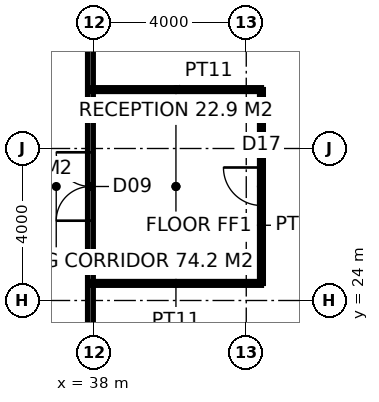
"""IFC4 building model, lengths in metres.
Left out: names, types, materials, properties, quantities, classifications, styles, units other than length and angle.
Written with IfcOpenShell. Run it as: python <this file> out.ifc"""

import sys

from ifc_helpers import new_model, si_unit, direction, frame, frame_2d, origin, place, context, subcontext, project, spatial, rectangle, extrude, element, fill, save


model = new_model("IFC4")
c1 = context("Model", 3, precision=1e-05, world=origin(), true_north=direction((0.0, 1.0)))
c2 = subcontext(c1, "Body", "Model", "MODEL_VIEW")
j1 = project(units=[si_unit("LENGTHUNIT", "METRE"), si_unit("PLANEANGLEUNIT", "RADIAN")], contexts=[c1])
p1 = place(None, origin())
s1 = spatial("IfcSite", under=j1, at=p1, CompositionType="ELEMENT")
p2 = place(p1, origin())
s2 = spatial("IfcBuilding", under=s1, at=p2, CompositionType="ELEMENT")
p3 = place(p2, frame((0.0, 0.0, 147.8)))
s3 = spatial("IfcBuildingStorey", under=s2, at=p3, CompositionType="ELEMENT", Elevation=147.8)
p4 = place(p3, frame((37.9, 15.625, 0.0), z_axis=(0.0, 0.0, 1.0), x_axis=(0.0, 1.0, 0.0)))
e1 = element("IfcWall", 1, at=p4, inside=s3, PredefinedType="PARTITIONING", context=c2, shape_type="SweptSolid", body=[
    extrude(rectangle(XDim=22.75, YDim=0.15, at=frame_2d((11.375, 0.0))), origin(), (0.0, 0.0, 1.0), 2.95),
])
p5 = place(p4, frame((10.475, 0.0, 0.0)))
e2 = element("IfcOpeningElement", 2, at=p5, cuts=e1, PredefinedType="OPENING", context=c2, shape_type="SweptSolid", body=[
    extrude(rectangle(XDim=1.8, YDim=2.4, at=frame_2d((0.9, 1.2))), frame((0.0, 0.085, 0.0), z_axis=(0.0, -1.0, 0.0), x_axis=(1.0, 0.0, 0.0)), (0.0, 0.0, 1.0), 0.17),
])
p6 = place(p3, frame((37.9, 24.45, 0.0), z_axis=(0.0, 0.0, 1.0), x_axis=(1.0, 0.0, 0.0)))
e3 = element("IfcWall", 3, at=p6, inside=s3, PredefinedType="PARTITIONING", context=c2, shape_type="SweptSolid", body=[
    extrude(rectangle(XDim=4.5, YDim=0.1, at=frame_2d((2.25, 0.0))), origin(), (0.0, 0.0, 1.0), 3.85),
])
p7 = place(p3, frame((42.4, 24.45, 0.0), z_axis=(0.0, 0.0, 1.0), x_axis=(0.0, 1.0, 0.0)))
e4 = element("IfcWall", 4, at=p7, inside=s3, PredefinedType="PARTITIONING", context=c2, shape_type="SweptSolid", body=[
    extrude(rectangle(XDim=5.1, YDim=0.1, at=frame_2d((2.55, 0.0))), origin(), (0.0, 0.0, 1.0), 3.85),
])
p8 = place(p7, frame((2.05, 0.0, 0.0)))
e5 = element("IfcOpeningElement", 5, at=p8, cuts=e4, PredefinedType="OPENING", context=c2, shape_type="SweptSolid", body=[
    extrude(rectangle(XDim=1.0, YDim=2.2, at=frame_2d((0.5, 1.1))), frame((0.0, 0.06, 0.0), z_axis=(0.0, -1.0, 0.0), x_axis=(1.0, 0.0, 0.0)), (0.0, 0.0, 1.0), 0.12),
])
p9 = place(p3, frame((42.4, 29.55, 0.0), z_axis=(0.0, 0.0, 1.0), x_axis=(-1.0, 0.0, 0.0)))
e6 = element("IfcWall", 6, at=p9, inside=s3, PredefinedType="PARTITIONING", context=c2, shape_type="SweptSolid", body=[
    extrude(rectangle(XDim=4.5, YDim=0.1, at=frame_2d((2.25, 0.0))), origin(), (0.0, 0.0, 1.0), 3.85),
])
p10 = place(p5, origin())
e7 = element("IfcDoor", 7, at=p10, inside=s3, OperationType="DOUBLE_DOOR_DOUBLE_SWING", PredefinedType="DOOR", context=c2, shape_type="SweptSolid", body=[
    extrude(rectangle(XDim=1.8, YDim=2.4, at=frame_2d((0.9, 1.2))), frame((0.0, 0.025, 0.0), z_axis=(0.0, -1.0, 0.0), x_axis=(1.0, 0.0, 0.0)), (0.0, 0.0, 1.0), 0.05),
])
fill(e2, e7)
p11 = place(p8, origin())
e8 = element("IfcDoor", 8, at=p11, inside=s3, OperationType="SINGLE_SWING_RIGHT", PredefinedType="DOOR", context=c2, shape_type="SweptSolid", body=[
    extrude(rectangle(XDim=1.0, YDim=2.2, at=frame_2d((0.5, 1.1))), frame((0.0, 0.025, 0.0), z_axis=(0.0, -1.0, 0.0), x_axis=(1.0, 0.0, 0.0)), (0.0, 0.0, 1.0), 0.05),
])
fill(e5, e8)
save(model, sys.argv[1])
